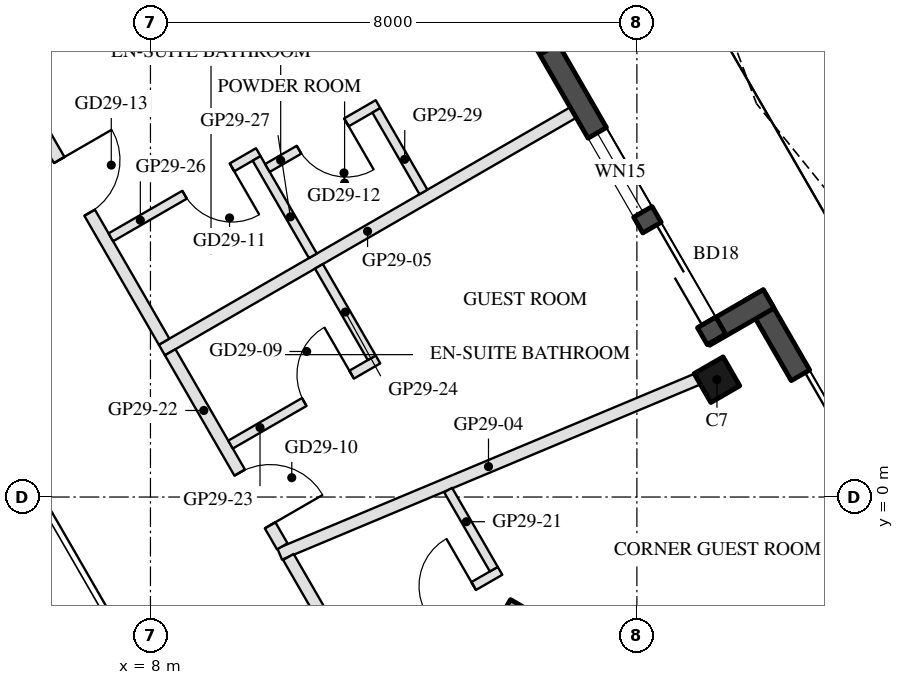
"""IFC4 building model, lengths in metres.
Left out: names, types, materials, properties, quantities, classifications, styles, units other than length and angle.
Written with IfcOpenShell. Run it as: python <this file> out.ifc"""

import sys

from ifc_helpers import new_model, si_unit, direction, frame, frame_2d, origin, origin_2d, place, context, subcontext, project, spatial, rectangle, hollow_rectangle, extrude, boolean, halfspace, element, fill, save


model = new_model("IFC4")
c1 = context("Model", 3, precision=1e-05, world=origin(), true_north=direction((0.0, 1.0)))
c2 = subcontext(c1, "Body", "Model", "MODEL_VIEW")
j1 = project(units=[si_unit("LENGTHUNIT", "METRE"), si_unit("PLANEANGLEUNIT", "RADIAN")], contexts=[c1])
p1 = place(None, origin())
s1 = spatial("IfcSite", under=j1, at=p1, CompositionType="ELEMENT")
p2 = place(p1, origin())
s2 = spatial("IfcBuilding", under=s1, at=p2, CompositionType="ELEMENT")
p3 = place(p2, frame((0.0, 0.0, 291.1)))
s3 = spatial("IfcBuildingStorey", under=s2, at=p3, CompositionType="ELEMENT", Elevation=291.1)
p4 = place(p3, frame((17.317, 1.93, 0.0), z_axis=(0.0, 0.0, 1.0), x_axis=(-0.5, 0.866025403784, 0.0)))
e1 = element("IfcColumn", 1, at=p4, inside=s3, PredefinedType="COLUMN", context=c2, shape_type="SweptSolid", body=[
    boolean("DIFFERENCE", extrude(hollow_rectangle(XDim=0.55, YDim=0.55, WallThickness=0.025, at=origin_2d()), origin(), (0.0, 0.0, 1.0), 3.7), halfspace(frame((0.0, 0.0, 0.034), z_axis=(0.0, 0.0, 1.0), x_axis=(1.0, 0.0, 0.0)), True)),
])
p5 = place(p3, frame((23.205, -5.819, 0.0), z_axis=(0.0, 0.0, 1.0), x_axis=(-0.500010118922, 0.866019561543, 0.0)))
e2 = element("IfcWall", 2, at=p5, inside=s3, PredefinedType="SOLIDWALL", context=c2, shape_type="SweptSolid", body=[
    extrude(rectangle(XDim=10.554, YDim=0.35, at=frame_2d((5.277, 0.0))), origin(), (0.0, 0.0, 1.0), 3.55),
])
p6 = place(p5, frame((0.566, 0.0, 0.3)))
e3 = element("IfcOpeningElement", 3, at=p6, cuts=e2, PredefinedType="OPENING", context=c2, shape_type="SweptSolid", body=[
    extrude(rectangle(XDim=1.4, YDim=2.65, at=frame_2d((0.7, 1.325))), frame((0.0, 0.185, 0.0), z_axis=(0.0, -1.0, 0.0), x_axis=(1.0, 0.0, 0.0)), (0.0, 0.0, 1.0), 0.37),
])
p7 = place(p5, frame((6.63, 0.0, 0.0)))
e4 = element("IfcOpeningElement", 4, at=p7, cuts=e2, PredefinedType="OPENING", context=c2, shape_type="SweptSolid", body=[
    extrude(rectangle(XDim=2.4, YDim=2.4, at=frame_2d((1.2, 1.2))), frame((0.0, 0.185, 0.0), z_axis=(0.0, -1.0, 0.0), x_axis=(1.0, 0.0, 0.0)), (0.0, 0.0, 1.0), 0.37),
])
p8 = place(p5, frame((3.292, 0.0, 0.3)))
e5 = element("IfcOpeningElement", 5, at=p8, cuts=e2, PredefinedType="OPENING", context=c2, shape_type="SweptSolid", body=[
    extrude(rectangle(XDim=3.0, YDim=2.65, at=frame_2d((1.5, 1.325))), frame((0.0, 0.185, 0.0), z_axis=(0.0, -1.0, 0.0), x_axis=(1.0, 0.0, 0.0)), (0.0, 0.0, 1.0), 0.37),
])
p9 = place(p3, frame((18.167, 3.258, 0.0), z_axis=(0.0, 0.0, 1.0), x_axis=(-0.866005645448, -0.500034220881, 0.0)))
e6 = element("IfcWall", 6, at=p9, inside=s3, PredefinedType="SOLIDWALL", context=c2, shape_type="SweptSolid", body=[
    extrude(rectangle(XDim=1.22, YDim=0.35, at=frame_2d((0.61, 0.0))), origin(), (0.0, 0.0, 1.0), 3.55),
])
p10 = place(p3, frame((17.308, 2.595, 0.0), z_axis=(0.0, 0.0, 1.0), x_axis=(-0.500005339912, 0.866022320763, 0.0)))
e7 = element("IfcWall", 7, at=p10, inside=s3, PredefinedType="SOLIDWALL", context=c2, shape_type="SweptSolid", body=[
    extrude(rectangle(XDim=5.827, YDim=0.35, at=frame_2d((2.914, 0.0))), origin(), (0.0, 0.0, 1.0), 3.55),
])
p11 = place(p10, frame((0.32, 0.0, 0.0)))
e8 = element("IfcOpeningElement", 8, at=p11, cuts=e7, PredefinedType="OPENING", context=c2, shape_type="SweptSolid", body=[
    extrude(rectangle(XDim=1.8, YDim=2.4, at=frame_2d((0.9, 1.2))), frame((0.0, 0.185, 0.0), z_axis=(0.0, -1.0, 0.0), x_axis=(1.0, 0.0, 0.0)), (0.0, 0.0, 1.0), 0.37),
])
p12 = place(p10, frame((2.42, 0.0, 0.3)))
e9 = element("IfcOpeningElement", 9, at=p12, cuts=e7, PredefinedType="OPENING", context=c2, shape_type="SweptSolid", body=[
    extrude(rectangle(XDim=1.5, YDim=2.65, at=frame_2d((0.75, 1.325))), frame((0.0, 0.185, 0.0), z_axis=(0.0, -1.0, 0.0), x_axis=(1.0, 0.0, 0.0)), (0.0, 0.0, 1.0), 0.37),
])
p13 = place(p3, frame((14.342, 7.443, 0.0), z_axis=(0.0, 0.0, 1.0), x_axis=(0.866092288191, 0.499884134912, 0.0)))
e10 = element("IfcWall", 10, at=p13, inside=s3, PredefinedType="SOLIDWALL", context=c2, shape_type="SweptSolid", body=[
    extrude(rectangle(XDim=1.22, YDim=0.35, at=frame_2d((0.61, 0.0))), origin(), (0.0, 0.0, 1.0), 3.55),
])
p14 = place(p3, frame((13.797, -1.903, 0.0), z_axis=(0.0, 0.0, 1.0), x_axis=(0.866025449148, -0.499999921427, 0.0)))
e11 = element("IfcWall", 11, at=p14, inside=s3, PredefinedType="SHEAR", context=c2, shape_type="SweptSolid", body=[
    extrude(rectangle(XDim=11.222, YDim=0.5, at=frame_2d((5.611, 0.0))), origin(), (0.0, 0.0, 1.0), 3.5),
])
p15 = place(p3, frame((16.994, 1.939, 0.0), z_axis=(0.0, 0.0, 1.0), x_axis=(-0.922394541425, -0.386249025824, 0.0)))
e12 = element("IfcWall", 12, at=p15, inside=s3, PredefinedType="PARTITIONING", context=c2, shape_type="SweptSolid", body=[
    extrude(rectangle(XDim=7.447, YDim=0.2, at=frame_2d((3.723, 0.0))), origin(), (0.0, 0.0, 1.0), 3.05),
])
p16 = place(p3, frame((14.953, 6.324, 0.0), z_axis=(0.0, 0.0, 1.0), x_axis=(-0.866030491634, -0.499991187483, 0.0)))
e13 = element("IfcWall", 13, at=p16, inside=s3, PredefinedType="PARTITIONING", context=c2, shape_type="SweptSolid", body=[
    extrude(rectangle(XDim=7.812, YDim=0.2, at=frame_2d((3.906, 0.0))), origin(), (0.0, 0.0, 1.0), 3.16),
])
p17 = place(p3, frame((10.269, -0.986, 0.0), z_axis=(0.0, 0.0, 1.0), x_axis=(0.50004472278, -0.865999581536, 0.0)))
e14 = element("IfcWall", 14, at=p17, inside=s3, PredefinedType="PARTITIONING", context=c2, shape_type="SweptSolid", body=[
    extrude(rectangle(XDim=4.0, YDim=0.2, at=frame_2d((2.0, 0.0))), origin(), (0.0, 0.0, 1.0), 3.05),
])
p18 = place(p17, frame((2.463, 0.0, 0.0)))
e15 = element("IfcOpeningElement", 15, at=p18, cuts=e14, PredefinedType="OPENING", context=c2, shape_type="SweptSolid", body=[
    extrude(rectangle(XDim=1.0, YDim=2.1, at=frame_2d((0.5, 1.05))), frame((0.0, 0.11, 0.0), z_axis=(0.0, -1.0, 0.0), x_axis=(1.0, 0.0, 0.0)), (0.0, 0.0, 1.0), 0.22),
])
p19 = place(p3, frame((11.324, -2.614, 0.0), z_axis=(0.0, 0.0, 1.0), x_axis=(0.866034573852, 0.49998411664, 0.0)))
e16 = element("IfcWall", 16, at=p19, inside=s3, PredefinedType="PARTITIONING", context=c2, shape_type="SweptSolid", body=[
    extrude(rectangle(XDim=2.8, YDim=0.15, at=frame_2d((1.4, 0.0))), origin(), (0.0, 0.0, 1.0), 3.55),
])
p20 = place(p19, frame((1.4, 0.0, 0.0)))
e17 = element("IfcOpeningElement", 17, at=p20, cuts=e16, PredefinedType="OPENING", context=c2, shape_type="SweptSolid", body=[
    extrude(rectangle(XDim=0.9, YDim=2.1, at=frame_2d((0.45, 1.05))), frame((0.0, 0.085, 0.0), z_axis=(0.0, -1.0, 0.0), x_axis=(1.0, 0.0, 0.0)), (0.0, 0.0, 1.0), 0.17),
])
p21 = place(p3, frame((13.646, -1.187, 0.0), z_axis=(0.0, 0.0, 1.0), x_axis=(-0.499985098601, 0.86603400694, 0.0)))
e18 = element("IfcWall", 18, at=p21, inside=s3, PredefinedType="PARTITIONING", context=c2, shape_type="SweptSolid", body=[
    extrude(rectangle(XDim=1.502, YDim=0.15, at=frame_2d((0.751, 0.0))), origin(), (0.0, 0.0, 1.0), 3.05),
])
p22 = place(p3, frame((8.325, 2.381, 0.0), z_axis=(0.0, 0.0, 1.0), x_axis=(0.499949858301, -0.866054351173, 0.0)))
e19 = element("IfcWall", 19, at=p22, inside=s3, PredefinedType="PARTITIONING", context=c2, shape_type="SweptSolid", body=[
    extrude(rectangle(XDim=3.687, YDim=0.2, at=frame_2d((1.843, 0.0))), origin(), (0.0, 0.0, 1.0), 3.05),
])
p23 = place(p22, frame((2.286, 0.0, 0.0)))
e20 = element("IfcOpeningElement", 20, at=p23, cuts=e19, PredefinedType="OPENING", context=c2, shape_type="SweptSolid", body=[
    extrude(rectangle(XDim=1.0, YDim=2.1, at=frame_2d((0.5, 1.05))), frame((0.0, 0.11, 0.0), z_axis=(0.0, -1.0, 0.0), x_axis=(1.0, 0.0, 0.0)), (0.0, 0.0, 1.0), 0.22),
])
p24 = place(p3, frame((9.317, 0.863, 0.0), z_axis=(0.0, 0.0, 1.0), x_axis=(0.865996816683, 0.500049511043, 0.0)))
e21 = element("IfcWall", 21, at=p24, inside=s3, PredefinedType="PARTITIONING", context=c2, shape_type="SweptSolid", body=[
    extrude(rectangle(XDim=2.8, YDim=0.15, at=frame_2d((1.4, 0.0))), origin(), (0.0, 0.0, 1.0), 3.55),
])
p25 = place(p24, frame((1.4, 0.0, 0.0)))
e22 = element("IfcOpeningElement", 22, at=p25, cuts=e21, PredefinedType="OPENING", context=c2, shape_type="SweptSolid", body=[
    extrude(rectangle(XDim=0.9, YDim=2.1, at=frame_2d((0.45, 1.05))), frame((0.0, 0.085, 0.0), z_axis=(0.0, -1.0, 0.0), x_axis=(1.0, 0.0, 0.0)), (0.0, 0.0, 1.0), 0.17),
])
p26 = place(p3, frame((11.639, 2.29, 0.0), z_axis=(0.0, 0.0, 1.0), x_axis=(-0.500115958453, 0.865958444789, 0.0)))
e23 = element("IfcWall", 23, at=p26, inside=s3, PredefinedType="PARTITIONING", context=c2, shape_type="SweptSolid", body=[
    extrude(rectangle(XDim=1.736, YDim=0.15, at=frame_2d((0.868, 0.0))), origin(), (0.0, 0.0, 1.0), 3.05),
])
p27 = place(p3, frame((2.281, 12.85, 0.0), z_axis=(0.0, 0.0, 1.0), x_axis=(0.500002143212, -0.866024166397, 0.0)))
e24 = element("IfcWall", 24, at=p27, inside=s3, PredefinedType="PARTITIONING", context=c2, shape_type="SweptSolid", body=[
    extrude(rectangle(XDim=11.888, YDim=0.2, at=frame_2d((5.944, 0.0))), origin(), (0.0, 0.0, 1.0), 3.05),
])
p28 = place(p27, frame((8.438, 0.0, 0.0)))
e25 = element("IfcOpeningElement", 25, at=p28, cuts=e24, PredefinedType="OPENING", context=c2, shape_type="SweptSolid", body=[
    extrude(rectangle(XDim=1.0, YDim=2.1, at=frame_2d((0.5, 1.05))), frame((0.0, 0.11, 0.0), z_axis=(0.0, -1.0, 0.0), x_axis=(1.0, 0.0, 0.0)), (0.0, 0.0, 1.0), 0.22),
])
p29 = place(p3, frame((9.774, 5.672, 0.0), z_axis=(0.0, 0.0, 1.0), x_axis=(-0.866056369097, -0.49994636267, 0.0)))
e26 = element("IfcWall", 26, at=p29, inside=s3, PredefinedType="PARTITIONING", context=c2, shape_type="SweptSolid", body=[
    extrude(rectangle(XDim=2.8, YDim=0.15, at=frame_2d((1.4, 0.0))), origin(), (0.0, 0.0, 1.0), 3.05),
])
p30 = place(p29, frame((0.5, 0.0, 0.0)))
e27 = element("IfcOpeningElement", 27, at=p30, cuts=e26, PredefinedType="OPENING", context=c2, shape_type="SweptSolid", body=[
    extrude(rectangle(XDim=0.9, YDim=2.1, at=frame_2d((0.45, 1.05))), frame((0.0, 0.085, 0.0), z_axis=(0.0, -1.0, 0.0), x_axis=(1.0, 0.0, 0.0)), (0.0, 0.0, 1.0), 0.17),
])
p31 = place(p3, frame((10.671, 3.967, 0.0), z_axis=(0.0, 0.0, 1.0), x_axis=(-0.500042316284, 0.866000971088, 0.0)))
e28 = element("IfcWall", 28, at=p31, inside=s3, PredefinedType="PARTITIONING", context=c2, shape_type="SweptSolid", body=[
    extrude(rectangle(XDim=1.85, YDim=0.15, at=frame_2d((0.925, 0.0))), origin(), (0.0, 0.0, 1.0), 3.05),
])
p32 = place(p3, frame((11.742, 6.462, 0.0), z_axis=(0.0, 0.0, 1.0), x_axis=(-0.866009402589, -0.500027713859, 0.0)))
e29 = element("IfcWall", 29, at=p32, inside=s3, PredefinedType="PARTITIONING", context=c2, shape_type="SweptSolid", body=[
    extrude(rectangle(XDim=2.1, YDim=0.15, at=frame_2d((1.05, 0.0))), origin(), (0.0, 0.0, 1.0), 3.55),
])
p33 = place(p32, frame((0.6, 0.0, 0.0)))
e30 = element("IfcOpeningElement", 30, at=p33, cuts=e29, PredefinedType="OPENING", context=c2, shape_type="SweptSolid", body=[
    extrude(rectangle(XDim=0.9, YDim=2.1, at=frame_2d((0.45, 1.05))), frame((0.0, 0.085, 0.0), z_axis=(0.0, -1.0, 0.0), x_axis=(1.0, 0.0, 0.0)), (0.0, 0.0, 1.0), 0.17),
])
p34 = place(p3, frame((12.49, 5.017, 0.0), z_axis=(0.0, 0.0, 1.0), x_axis=(-0.499967891604, 0.866043940782, 0.0)))
e31 = element("IfcWall", 31, at=p34, inside=s3, PredefinedType="PARTITIONING", context=c2, shape_type="SweptSolid", body=[
    extrude(rectangle(XDim=1.55, YDim=0.15, at=frame_2d((0.775, 0.0))), origin(), (0.0, 0.0, 1.0), 3.55),
])
p35 = place(p7, frame((2.4, 0.0, 0.0), z_axis=(0.0, 0.0, 1.0), x_axis=(-1.0, 0.0, 0.0)))
e32 = element("IfcDoor", 32, at=p35, inside=s3, OperationType="SLIDING_TO_LEFT", PredefinedType="DOOR", context=c2, shape_type="SweptSolid", body=[
    extrude(rectangle(XDim=2.4, YDim=2.4, at=frame_2d((1.2, 1.2))), frame((0.0, 0.025, 0.0), z_axis=(0.0, -1.0, 0.0), x_axis=(1.0, 0.0, 0.0)), (0.0, 0.0, 1.0), 0.05),
])
fill(e4, e32)
p36 = place(p11, frame((1.8, 0.0, 0.0), z_axis=(0.0, 0.0, 1.0), x_axis=(-1.0, 0.0, 0.0)))
e33 = element("IfcDoor", 33, at=p36, inside=s3, OperationType="SLIDING_TO_LEFT", PredefinedType="DOOR", context=c2, shape_type="SweptSolid", body=[
    extrude(rectangle(XDim=1.8, YDim=2.4, at=frame_2d((0.9, 1.2))), frame((0.0, 0.025, 0.0), z_axis=(0.0, -1.0, 0.0), x_axis=(1.0, 0.0, 0.0)), (0.0, 0.0, 1.0), 0.05),
])
fill(e8, e33)
p37 = place(p12, origin())
e34 = element("IfcWindow", 34, at=p37, inside=s3, PartitioningType="SINGLE_PANEL", PredefinedType="WINDOW", context=c2, shape_type="SweptSolid", body=[
    extrude(rectangle(XDim=1.5, YDim=2.65, at=frame_2d((0.75, 1.325))), frame((0.0, 0.03, 0.0), z_axis=(0.0, -1.0, 0.0), x_axis=(1.0, 0.0, 0.0)), (0.0, 0.0, 1.0), 0.06),
])
fill(e9, e34)
p38 = place(p20, origin())
e35 = element("IfcDoor", 35, at=p38, inside=s3, OperationType="SINGLE_SWING_RIGHT", PredefinedType="DOOR", context=c2, shape_type="SweptSolid", body=[
    extrude(rectangle(XDim=0.9, YDim=2.1, at=frame_2d((0.45, 1.05))), frame((0.0, 0.025, 0.0), z_axis=(0.0, -1.0, 0.0), x_axis=(1.0, 0.0, 0.0)), (0.0, 0.0, 1.0), 0.05),
])
fill(e17, e35)
p39 = place(p25, origin())
e36 = element("IfcDoor", 36, at=p39, inside=s3, OperationType="SINGLE_SWING_RIGHT", PredefinedType="DOOR", context=c2, shape_type="SweptSolid", body=[
    extrude(rectangle(XDim=0.9, YDim=2.1, at=frame_2d((0.45, 1.05))), frame((0.0, 0.025, 0.0), z_axis=(0.0, -1.0, 0.0), x_axis=(1.0, 0.0, 0.0)), (0.0, 0.0, 1.0), 0.05),
])
fill(e22, e36)
p40 = place(p23, origin())
e37 = element("IfcDoor", 37, at=p40, inside=s3, OperationType="SINGLE_SWING_RIGHT", PredefinedType="DOOR", context=c2, shape_type="SweptSolid", body=[
    extrude(rectangle(XDim=1.0, YDim=2.1, at=frame_2d((0.5, 1.05))), frame((0.0, 0.025, 0.0), z_axis=(0.0, -1.0, 0.0), x_axis=(1.0, 0.0, 0.0)), (0.0, 0.0, 1.0), 0.05),
])
fill(e20, e37)
p41 = place(p30, origin())
e38 = element("IfcDoor", 38, at=p41, inside=s3, OperationType="SINGLE_SWING_LEFT", PredefinedType="DOOR", context=c2, shape_type="SweptSolid", body=[
    extrude(rectangle(XDim=0.9, YDim=2.1, at=frame_2d((0.45, 1.05))), frame((0.0, 0.025, 0.0), z_axis=(0.0, -1.0, 0.0), x_axis=(1.0, 0.0, 0.0)), (0.0, 0.0, 1.0), 0.05),
])
fill(e27, e38)
p42 = place(p33, origin())
e39 = element("IfcDoor", 39, at=p42, inside=s3, OperationType="SINGLE_SWING_LEFT", PredefinedType="DOOR", context=c2, shape_type="SweptSolid", body=[
    extrude(rectangle(XDim=0.9, YDim=2.1, at=frame_2d((0.45, 1.05))), frame((0.0, 0.025, 0.0), z_axis=(0.0, -1.0, 0.0), x_axis=(1.0, 0.0, 0.0)), (0.0, 0.0, 1.0), 0.05),
])
fill(e30, e39)
p43 = place(p28, origin())
e40 = element("IfcDoor", 40, at=p43, inside=s3, OperationType="SINGLE_SWING_LEFT", PredefinedType="DOOR", context=c2, shape_type="SweptSolid", body=[
    extrude(rectangle(XDim=1.0, YDim=2.1, at=frame_2d((0.5, 1.05))), frame((0.0, 0.025, 0.0), z_axis=(0.0, -1.0, 0.0), x_axis=(1.0, 0.0, 0.0)), (0.0, 0.0, 1.0), 0.05),
])
fill(e25, e40)
save(model, sys.argv[1])
